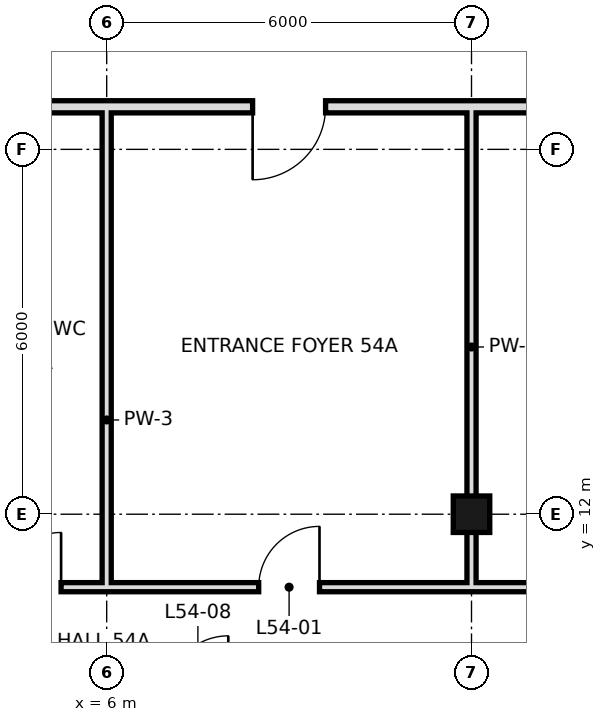
"""IFC4 building model, lengths in metres.
Left out: names, types, materials, properties, quantities, classifications, styles, units other than length and angle.
Written with IfcOpenShell. Run it as: python <this file> out.ifc"""

import sys

from ifc_helpers import new_model, si_unit, direction, frame, frame_2d, origin, origin_2d, place, context, subcontext, project, spatial, rectangle, hollow_rectangle, extrude, element, fill, save


model = new_model("IFC4")
c1 = context("Model", 3, precision=1e-05, world=origin(), true_north=direction((0.0, 1.0)))
c2 = subcontext(c1, "Body", "Model", "MODEL_VIEW")
j1 = project(units=[si_unit("LENGTHUNIT", "METRE"), si_unit("PLANEANGLEUNIT", "RADIAN")], contexts=[c1])
p1 = place(None, origin())
s1 = spatial("IfcSite", under=j1, at=p1, CompositionType="ELEMENT")
p2 = place(p1, origin())
s2 = spatial("IfcBuilding", under=s1, at=p2, CompositionType="ELEMENT")
p3 = place(p2, frame((0.0, 0.0, 229.8)))
s3 = spatial("IfcBuildingStorey", under=s2, at=p3, CompositionType="ELEMENT", Elevation=229.8)
p4 = place(p3, frame((12.0, 12.0, 0.0), z_axis=(0.0, 0.0, 1.0), x_axis=(1.0, 0.0, 0.0)))
e1 = element("IfcColumn", 1, at=p4, inside=s3, PredefinedType="COLUMN", context=c2, shape_type="SweptSolid", body=[
    extrude(hollow_rectangle(XDim=0.6, YDim=0.6, WallThickness=0.028, at=origin_2d()), origin(), (0.0, 0.0, 1.0), 4.4),
])
for number, where, z_axis, x_axis in (
    (2, (12.0, 10.8, 0.0), (0.0, 0.0, 1.0), (0.0, 1.0, 0.0)),
    (3, (6.0, 10.8, 0.0), (0.0, 0.0, 1.0), (0.0, 1.0, 0.0)),
):
    element("IfcWall", number, at=place(p3, frame(where, z_axis=z_axis, x_axis=x_axis)), inside=s3, PredefinedType="PARTITIONING", context=c2, shape_type="SweptSolid", body=[
        extrude(rectangle(XDim=7.9, YDim=0.15, at=frame_2d((3.95, 0.0))), origin(), (0.0, 0.0, 1.0), 3.4),
    ])
p5 = place(p3, frame((6.0, 10.8, 0.0), z_axis=(0.0, 0.0, 1.0), x_axis=(1.0, 0.0, 0.0)))
e4 = element("IfcWall", 4, at=p5, inside=s3, PredefinedType="PARTITIONING", context=c2, shape_type="SweptSolid", body=[
    extrude(rectangle(XDim=18.0, YDim=0.15, at=frame_2d((9.0, 0.0))), origin(), (0.0, 0.0, 1.0), 4.1),
])
p6 = place(p5, frame((2.5, 0.0, 0.0)))
e5 = element("IfcOpeningElement", 5, at=p6, cuts=e4, PredefinedType="OPENING", context=c2, shape_type="SweptSolid", body=[
    extrude(rectangle(XDim=1.0, YDim=2.4, at=frame_2d((0.5, 1.2))), frame((0.0, 0.085, 0.0), z_axis=(0.0, -1.0, 0.0), x_axis=(1.0, 0.0, 0.0)), (0.0, 0.0, 1.0), 0.17),
])
p7 = place(p5, frame((11.5, 0.0, 0.0)))
e6 = element("IfcOpeningElement", 6, at=p7, cuts=e4, PredefinedType="OPENING", context=c2, shape_type="SweptSolid", body=[
    extrude(rectangle(XDim=1.0, YDim=2.4, at=frame_2d((0.5, 1.2))), frame((0.0, 0.085, 0.0), z_axis=(0.0, -1.0, 0.0), x_axis=(1.0, 0.0, 0.0)), (0.0, 0.0, 1.0), 0.17),
])
p8 = place(p3, frame((3.6, 10.8, 0.0), z_axis=(0.0, 0.0, 1.0), x_axis=(1.0, 0.0, 0.0)))
e7 = element("IfcWall", 7, at=p8, inside=s3, PredefinedType="PARTITIONING", context=c2, shape_type="SweptSolid", body=[
    extrude(rectangle(XDim=2.4, YDim=0.15, at=frame_2d((1.2, 0.0))), origin(), (0.0, 0.0, 1.0), 4.1),
])
p9 = place(p8, frame((0.75, 0.0, 0.0)))
e8 = element("IfcOpeningElement", 8, at=p9, cuts=e7, PredefinedType="OPENING", context=c2, shape_type="SweptSolid", body=[
    extrude(rectangle(XDim=0.9, YDim=2.4, at=frame_2d((0.45, 1.2))), frame((0.0, 0.085, 0.0), z_axis=(0.0, -1.0, 0.0), x_axis=(1.0, 0.0, 0.0)), (0.0, 0.0, 1.0), 0.17),
])
p10 = place(p3, frame((3.6, 18.7, 0.0), z_axis=(0.0, 0.0, 1.0), x_axis=(1.0, 0.0, 0.0)))
e9 = element("IfcWall", 9, at=p10, inside=s3, PredefinedType="SOLIDWALL", context=c2, shape_type="SweptSolid", body=[
    extrude(rectangle(XDim=20.4, YDim=0.2, at=frame_2d((10.2, 0.0))), origin(), (0.0, 0.0, 1.0), 3.4),
])
p11 = place(p10, frame((4.8, 0.0, 0.0)))
e10 = element("IfcOpeningElement", 10, at=p11, cuts=e9, PredefinedType="OPENING", context=c2, shape_type="SweptSolid", body=[
    extrude(rectangle(XDim=1.2, YDim=2.4, at=frame_2d((0.6, 1.2))), frame((0.0, 0.11, 0.0), z_axis=(0.0, -1.0, 0.0), x_axis=(1.0, 0.0, 0.0)), (0.0, 0.0, 1.0), 0.22),
])
p12 = place(p6, frame((1.0, 0.0, 0.0), z_axis=(0.0, 0.0, 1.0), x_axis=(-1.0, 0.0, 0.0)))
e11 = element("IfcDoor", 11, at=p12, inside=s3, OperationType="SINGLE_SWING_LEFT", PredefinedType="DOOR", context=c2, shape_type="SweptSolid", body=[
    extrude(rectangle(XDim=1.0, YDim=2.4, at=frame_2d((0.5, 1.2))), frame((0.0, 0.025, 0.0), z_axis=(0.0, -1.0, 0.0), x_axis=(1.0, 0.0, 0.0)), (0.0, 0.0, 1.0), 0.05),
])
fill(e5, e11)
p13 = place(p9, frame((0.9, 0.0, 0.0), z_axis=(0.0, 0.0, 1.0), x_axis=(-1.0, 0.0, 0.0)))
e12 = element("IfcDoor", 12, at=p13, inside=s3, OperationType="SINGLE_SWING_LEFT", PredefinedType="DOOR", context=c2, shape_type="SweptSolid", body=[
    extrude(rectangle(XDim=0.9, YDim=2.4, at=frame_2d((0.45, 1.2))), frame((0.0, 0.025, 0.0), z_axis=(0.0, -1.0, 0.0), x_axis=(1.0, 0.0, 0.0)), (0.0, 0.0, 1.0), 0.05),
])
fill(e8, e12)
p14 = place(p11, frame((1.2, 0.0, 0.0), z_axis=(0.0, 0.0, 1.0), x_axis=(-1.0, 0.0, 0.0)))
e13 = element("IfcDoor", 13, at=p14, inside=s3, OperationType="SINGLE_SWING_RIGHT", PredefinedType="DOOR", context=c2, shape_type="SweptSolid", body=[
    extrude(rectangle(XDim=1.2, YDim=2.4, at=frame_2d((0.6, 1.2))), frame((0.0, 0.025, 0.0), z_axis=(0.0, -1.0, 0.0), x_axis=(1.0, 0.0, 0.0)), (0.0, 0.0, 1.0), 0.05),
])
fill(e10, e13)
save(model, sys.argv[1])
